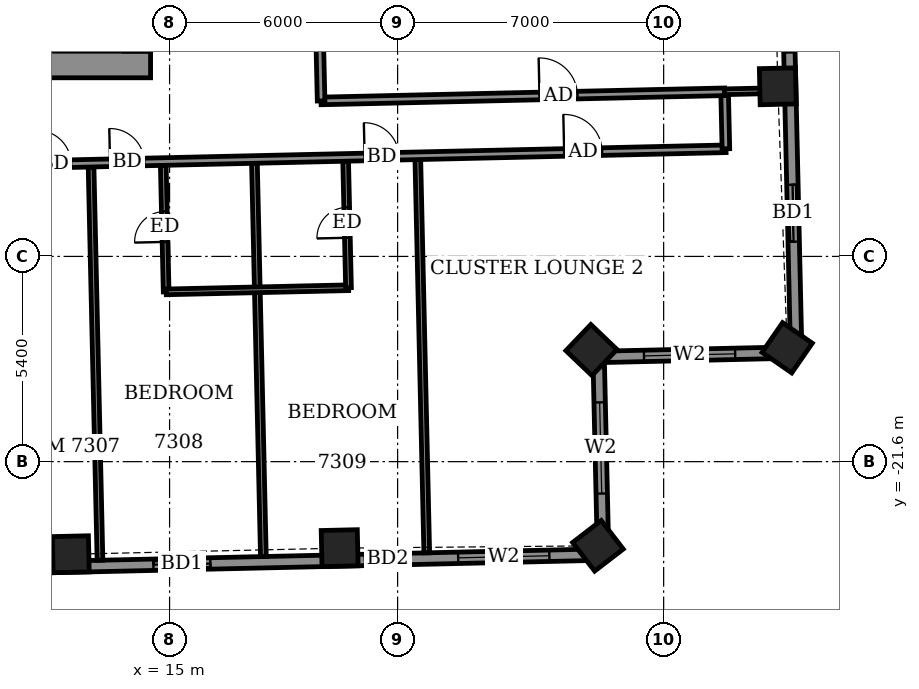
"""IFC4 building model, lengths in metres.
Left out: names, types, materials, properties, quantities, classifications, styles, units other than length and angle.
Written with IfcOpenShell. Run it as: python <this file> out.ifc"""

import sys

from ifc_helpers import new_model, si_unit, direction, frame, frame_2d, origin, origin_2d, place, context, subcontext, project, spatial, rectangle, extrude, element, fill, save


model = new_model("IFC4")
c1 = context("Model", 3, precision=1e-05, world=origin(), true_north=direction((0.0, 1.0)))
c2 = subcontext(c1, "Body", "Model", "MODEL_VIEW")
j1 = project(units=[si_unit("LENGTHUNIT", "METRE"), si_unit("PLANEANGLEUNIT", "RADIAN")], contexts=[c1])
p1 = place(None, origin())
s1 = spatial("IfcSite", under=j1, at=p1, CompositionType="ELEMENT")
p2 = place(p1, origin())
s2 = spatial("IfcBuilding", under=s1, at=p2, CompositionType="ELEMENT")
p3 = place(p2, frame((0.0, 0.0, 287.1)))
s3 = spatial("IfcBuildingStorey", under=s2, at=p3, CompositionType="ELEMENT", Elevation=287.1)
for number, where, z_axis, x_axis in (
    (1, (12.4, -24.036, -0.55), (0.0, 0.0, 1.0), (1.0, 0.023, 0.0)),
    (2, (19.475, -23.876, -0.55), (0.0, 0.0, 1.0), (1.0, 0.023, 0.0)),
    (3, (26.271, -23.814, -0.55), (0.0, 0.0, 1.0), (0.792, 0.61, 0.0)),
    (4, (26.1, -18.664, -0.55), (0.0, 0.0, 1.0), (0.691, 0.723, 0.0)),
    (5, (31.25, -18.604, -0.55), (0.0, 0.0, 1.0), (0.569, 0.822, 0.0)),
    (6, (31.004, -11.724, -0.55), (0.0, 0.0, 1.0), (-0.023, 1.0, 0.0)),
):
    element("IfcColumn", number, at=place(p3, frame(where, z_axis=z_axis, x_axis=x_axis)), inside=s3, PredefinedType="COLUMN", context=c2, shape_type="SweptSolid", body=[
        extrude(rectangle(XDim=0.95, YDim=0.95, at=origin_2d()), origin(), (0.0, 0.0, 1.0), 3.6),
    ])
p4 = place(p3, frame((31.488, -18.727, 0.0), z_axis=(0.0, 0.0, 1.0), x_axis=(-0.022666132143, 0.999743090226, 0.0)))
e7 = element("IfcWall", 7, at=p4, inside=s3, PredefinedType="SOLIDWALL", context=c2, shape_type="SweptSolid", body=[
    extrude(rectangle(XDim=14.649, YDim=0.3, at=frame_2d((7.324, 0.0))), origin(), (0.0, 0.0, 1.0), 2.5),
])
p5 = place(p4, frame((2.915, 0.0, 0.0)))
e8 = element("IfcOpeningElement", 8, at=p5, cuts=e7, PredefinedType="OPENING", context=c2, shape_type="SweptSolid", body=[
    extrude(rectangle(XDim=1.5, YDim=2.4, at=frame_2d((0.75, 1.2))), frame((0.0, 0.16, 0.0), z_axis=(0.0, -1.0, 0.0), x_axis=(1.0, 0.0, 0.0)), (0.0, 0.0, 1.0), 0.32),
])
p6 = place(p4, frame((7.895, 0.0, 0.9)))
e9 = element("IfcOpeningElement", 9, at=p6, cuts=e7, PredefinedType="OPENING", context=c2, shape_type="SweptSolid", body=[
    extrude(rectangle(XDim=2.4, YDim=1.5, at=frame_2d((1.2, 0.75))), frame((0.0, 0.16, 0.0), z_axis=(0.0, -1.0, 0.0), x_axis=(1.0, 0.0, 0.0)), (0.0, 0.0, 1.0), 0.32),
])
p7 = place(p3, frame((-22.816, -25.161, 0.0), z_axis=(0.0, 0.0, 1.0), x_axis=(0.999742646411, 0.022685699159, 0.0)))
e10 = element("IfcWall", 10, at=p7, inside=s3, PredefinedType="SOLIDWALL", context=c2, shape_type="SweptSolid", body=[
    extrude(rectangle(XDim=49.236, YDim=0.3, at=frame_2d((24.618, 0.0))), origin(), (0.0, 0.0, 1.0), 2.5),
])
p8 = place(p7, frame((2.277, 0.0, 0.0)))
e11 = element("IfcOpeningElement", 11, at=p8, cuts=e10, PredefinedType="OPENING", context=c2, shape_type="SweptSolid", body=[
    extrude(rectangle(XDim=1.5, YDim=2.4, at=frame_2d((0.75, 1.2))), frame((0.0, 0.16, 0.0), z_axis=(0.0, -1.0, 0.0), x_axis=(1.0, 0.0, 0.0)), (0.0, 0.0, 1.0), 0.32),
])
p9 = place(p7, frame((7.726, 0.0, 0.0)))
e12 = element("IfcOpeningElement", 12, at=p9, cuts=e10, PredefinedType="OPENING", context=c2, shape_type="SweptSolid", body=[
    extrude(rectangle(XDim=1.5, YDim=2.4, at=frame_2d((0.75, 1.2))), frame((0.0, 0.16, 0.0), z_axis=(0.0, -1.0, 0.0), x_axis=(1.0, 0.0, 0.0)), (0.0, 0.0, 1.0), 0.32),
])
p10 = place(p7, frame((11.039, 0.0, 0.0)))
e13 = element("IfcOpeningElement", 13, at=p10, cuts=e10, PredefinedType="OPENING", context=c2, shape_type="SweptSolid", body=[
    extrude(rectangle(XDim=1.5, YDim=2.4, at=frame_2d((0.75, 1.2))), frame((0.0, 0.16, 0.0), z_axis=(0.0, -1.0, 0.0), x_axis=(1.0, 0.0, 0.0)), (0.0, 0.0, 1.0), 0.32),
])
p11 = place(p7, frame((15.589, 0.0, 0.0)))
e14 = element("IfcOpeningElement", 14, at=p11, cuts=e10, PredefinedType="OPENING", context=c2, shape_type="SweptSolid", body=[
    extrude(rectangle(XDim=1.5, YDim=2.4, at=frame_2d((0.75, 1.2))), frame((0.0, 0.16, 0.0), z_axis=(0.0, -1.0, 0.0), x_axis=(1.0, 0.0, 0.0)), (0.0, 0.0, 1.0), 0.32),
])
p12 = place(p7, frame((18.903, 0.0, 0.0)))
e15 = element("IfcOpeningElement", 15, at=p12, cuts=e10, PredefinedType="OPENING", context=c2, shape_type="SweptSolid", body=[
    extrude(rectangle(XDim=1.5, YDim=2.4, at=frame_2d((0.75, 1.2))), frame((0.0, 0.16, 0.0), z_axis=(0.0, -1.0, 0.0), x_axis=(1.0, 0.0, 0.0)), (0.0, 0.0, 1.0), 0.32),
])
p13 = place(p7, frame((24.3, 0.0, 0.0)))
e16 = element("IfcOpeningElement", 16, at=p13, cuts=e10, PredefinedType="OPENING", context=c2, shape_type="SweptSolid", body=[
    extrude(rectangle(XDim=1.5, YDim=2.4, at=frame_2d((0.75, 1.2))), frame((0.0, 0.16, 0.0), z_axis=(0.0, -1.0, 0.0), x_axis=(1.0, 0.0, 0.0)), (0.0, 0.0, 1.0), 0.32),
])
p14 = place(p7, frame((29.265, 0.0, 0.0)))
e17 = element("IfcOpeningElement", 17, at=p14, cuts=e10, PredefinedType="OPENING", context=c2, shape_type="SweptSolid", body=[
    extrude(rectangle(XDim=1.5, YDim=2.4, at=frame_2d((0.75, 1.2))), frame((0.0, 0.16, 0.0), z_axis=(0.0, -1.0, 0.0), x_axis=(1.0, 0.0, 0.0)), (0.0, 0.0, 1.0), 0.32),
])
p15 = place(p7, frame((32.579, 0.0, 0.0)))
e18 = element("IfcOpeningElement", 18, at=p15, cuts=e10, PredefinedType="OPENING", context=c2, shape_type="SweptSolid", body=[
    extrude(rectangle(XDim=1.5, YDim=2.4, at=frame_2d((0.75, 1.2))), frame((0.0, 0.16, 0.0), z_axis=(0.0, -1.0, 0.0), x_axis=(1.0, 0.0, 0.0)), (0.0, 0.0, 1.0), 0.32),
])
p16 = place(p7, frame((37.4, 0.0, 0.0)))
e19 = element("IfcOpeningElement", 19, at=p16, cuts=e10, PredefinedType="OPENING", context=c2, shape_type="SweptSolid", body=[
    extrude(rectangle(XDim=1.5, YDim=2.4, at=frame_2d((0.75, 1.2))), frame((0.0, 0.16, 0.0), z_axis=(0.0, -1.0, 0.0), x_axis=(1.0, 0.0, 0.0)), (0.0, 0.0, 1.0), 0.32),
])
p17 = place(p7, frame((42.967, 0.0, 0.0)))
e20 = element("IfcOpeningElement", 20, at=p17, cuts=e10, PredefinedType="OPENING", context=c2, shape_type="SweptSolid", body=[
    extrude(rectangle(XDim=1.2, YDim=2.4, at=frame_2d((0.6, 1.2))), frame((0.0, 0.16, 0.0), z_axis=(0.0, -1.0, 0.0), x_axis=(1.0, 0.0, 0.0)), (0.0, 0.0, 1.0), 0.32),
])
p18 = place(p7, frame((45.421, 0.0, 0.9)))
e21 = element("IfcOpeningElement", 21, at=p18, cuts=e10, PredefinedType="OPENING", context=c2, shape_type="SweptSolid", body=[
    extrude(rectangle(XDim=2.4, YDim=1.5, at=frame_2d((1.2, 0.75))), frame((0.0, 0.16, 0.0), z_axis=(0.0, -1.0, 0.0), x_axis=(1.0, 0.0, 0.0)), (0.0, 0.0, 1.0), 0.32),
])
p19 = place(p3, frame((26.407, -24.044, 0.0), z_axis=(0.0, 0.0, 1.0), x_axis=(-0.022675548694, 0.99974287669, 0.0)))
e22 = element("IfcWall", 22, at=p19, inside=s3, PredefinedType="SOLIDWALL", context=c2, shape_type="SweptSolid", body=[
    extrude(rectangle(XDim=5.2, YDim=0.3, at=frame_2d((2.6, 0.0))), origin(), (0.0, 0.0, 1.0), 2.55),
])
p20 = place(p19, frame((1.605, 0.0, 0.9)))
e23 = element("IfcOpeningElement", 23, at=p20, cuts=e22, PredefinedType="OPENING", context=c2, shape_type="SweptSolid", body=[
    extrude(rectangle(XDim=2.4, YDim=1.5, at=frame_2d((1.2, 0.75))), frame((0.0, 0.16, 0.0), z_axis=(0.0, -1.0, 0.0), x_axis=(1.0, 0.0, 0.0)), (0.0, 0.0, 1.0), 0.32),
])
p21 = place(p3, frame((26.289, -18.845, 0.0), z_axis=(0.0, 0.0, 1.0), x_axis=(0.99974287669, 0.022675548694, 0.0)))
e24 = element("IfcWall", 24, at=p21, inside=s3, PredefinedType="SOLIDWALL", context=c2, shape_type="SweptSolid", body=[
    extrude(rectangle(XDim=5.2, YDim=0.3, at=frame_2d((2.6, 0.0))), origin(), (0.0, 0.0, 1.0), 2.55),
])
p22 = place(p21, frame((1.194, 0.0, 0.9)))
e25 = element("IfcOpeningElement", 25, at=p22, cuts=e24, PredefinedType="OPENING", context=c2, shape_type="SweptSolid", body=[
    extrude(rectangle(XDim=2.4, YDim=1.5, at=frame_2d((1.2, 0.75))), frame((0.0, 0.16, 0.0), z_axis=(0.0, -1.0, 0.0), x_axis=(1.0, 0.0, 0.0)), (0.0, 0.0, 1.0), 0.32),
])
p23 = place(p3, frame((13.169, -24.194, 0.0), z_axis=(0.0, 0.0, 1.0), x_axis=(-0.022692470342, 0.99974249274, 0.0)))
e26 = element("IfcWall", 26, at=p23, inside=s3, PredefinedType="PARTITIONING", context=c2, shape_type="SweptSolid", body=[
    extrude(rectangle(XDim=10.35, YDim=0.15, at=frame_2d((5.175, 0.0))), origin(), (0.0, 0.0, 1.0), 2.5),
])
p24 = place(p3, frame((17.468, -24.097, 0.0), z_axis=(0.0, 0.0, 1.0), x_axis=(-0.022714440015, 0.999741993824, 0.0)))
e27 = element("IfcWall", 27, at=p24, inside=s3, PredefinedType="PARTITIONING", context=c2, shape_type="SweptSolid", body=[
    extrude(rectangle(XDim=10.351, YDim=0.15, at=frame_2d((5.175, 0.0))), origin(), (0.0, 0.0, 1.0), 2.5),
])
p25 = place(p3, frame((21.767, -23.999, 0.0), z_axis=(0.0, 0.0, 1.0), x_axis=(-0.022716582742, 0.999741945138, 0.0)))
e28 = element("IfcWall", 28, at=p25, inside=s3, PredefinedType="PARTITIONING", context=c2, shape_type="SweptSolid", body=[
    extrude(rectangle(XDim=10.35, YDim=0.15, at=frame_2d((5.175, 0.0))), origin(), (0.0, 0.0, 1.0), 2.55),
])
p26 = place(p3, frame((14.91, -17.133, 0.0), z_axis=(0.0, 0.0, 1.0), x_axis=(-0.022801345323, 0.99974001553, 0.0)))
e29 = element("IfcWall", 29, at=p26, inside=s3, PredefinedType="PARTITIONING", context=c2, shape_type="SweptSolid", body=[
    extrude(rectangle(XDim=3.33, YDim=0.15, at=frame_2d((1.665, 0.0))), origin(), (0.0, 0.0, 1.0), 3.05),
])
p27 = place(p26, frame((1.315, 0.0, 0.0)))
e30 = element("IfcOpeningElement", 30, at=p27, cuts=e29, PredefinedType="OPENING", context=c2, shape_type="SweptSolid", body=[
    extrude(rectangle(XDim=0.8, YDim=2.1, at=frame_2d((0.4, 1.05))), frame((0.0, 0.085, 0.0), z_axis=(0.0, -1.0, 0.0), x_axis=(1.0, 0.0, 0.0)), (0.0, 0.0, 1.0), 0.17),
])
p28 = place(p3, frame((14.912, -17.133, 0.0), z_axis=(0.0, 0.0, 1.0), x_axis=(0.999741415159, 0.022739894798, 0.0)))
e31 = element("IfcWall", 31, at=p28, inside=s3, PredefinedType="PARTITIONING", context=c2, shape_type="SweptSolid", body=[
    extrude(rectangle(XDim=4.799, YDim=0.15, at=frame_2d((2.399, 0.0))), origin(), (0.0, 0.0, 1.0), 3.05),
])
p29 = place(p3, frame((19.708, -17.024, 0.0), z_axis=(0.0, 0.0, 1.0), x_axis=(-0.022509879905, 0.999746620553, 0.0)))
e32 = element("IfcWall", 32, at=p29, inside=s3, PredefinedType="PARTITIONING", context=c2, shape_type="SweptSolid", body=[
    extrude(rectangle(XDim=3.33, YDim=0.15, at=frame_2d((1.665, 0.0))), origin(), (0.0, 0.0, 1.0), 3.05),
])
p30 = place(p29, frame((1.315, 0.0, 0.0)))
e33 = element("IfcOpeningElement", 33, at=p30, cuts=e32, PredefinedType="OPENING", context=c2, shape_type="SweptSolid", body=[
    extrude(rectangle(XDim=0.8, YDim=2.1, at=frame_2d((0.4, 1.05))), frame((0.0, 0.085, 0.0), z_axis=(0.0, -1.0, 0.0), x_axis=(1.0, 0.0, 0.0)), (0.0, 0.0, 1.0), 0.17),
])
p31 = place(p3, frame((-25.731, -14.624, 0.0), z_axis=(0.0, 0.0, 1.0), x_axis=(0.999742799525, 0.022678950563, 0.0)))
e34 = element("IfcWall", 34, at=p31, inside=s3, PredefinedType="PARTITIONING", context=c2, shape_type="SweptSolid", body=[
    extrude(rectangle(XDim=55.386, YDim=0.2, at=frame_2d((27.693, 0.0))), origin(), (0.0, 0.0, 1.0), 3.05),
])
p32 = place(p31, frame((3.149, 0.0, 0.0)))
e35 = element("IfcOpeningElement", 35, at=p32, cuts=e34, PredefinedType="OPENING", context=c2, shape_type="SweptSolid", body=[
    extrude(rectangle(XDim=1.0, YDim=2.1, at=frame_2d((0.5, 1.05))), frame((0.0, 0.11, 0.0), z_axis=(0.0, -1.0, 0.0), x_axis=(1.0, 0.0, 0.0)), (0.0, 0.0, 1.0), 0.22),
])
p33 = place(p31, frame((11.1, 0.0, 0.0)))
e36 = element("IfcOpeningElement", 36, at=p33, cuts=e34, PredefinedType="OPENING", context=c2, shape_type="SweptSolid", body=[
    extrude(rectangle(XDim=0.9, YDim=2.1, at=frame_2d((0.45, 1.05))), frame((0.0, 0.11, 0.0), z_axis=(0.0, -1.0, 0.0), x_axis=(1.0, 0.0, 0.0)), (0.0, 0.0, 1.0), 0.22),
])
p34 = place(p31, frame((12.95, 0.0, 0.0)))
e37 = element("IfcOpeningElement", 37, at=p34, cuts=e34, PredefinedType="OPENING", context=c2, shape_type="SweptSolid", body=[
    extrude(rectangle(XDim=0.9, YDim=2.1, at=frame_2d((0.45, 1.05))), frame((0.0, 0.11, 0.0), z_axis=(0.0, -1.0, 0.0), x_axis=(1.0, 0.0, 0.0)), (0.0, 0.0, 1.0), 0.22),
])
p35 = place(p31, frame((19.675, 0.0, 0.0)))
e38 = element("IfcOpeningElement", 38, at=p35, cuts=e34, PredefinedType="OPENING", context=c2, shape_type="SweptSolid", body=[
    extrude(rectangle(XDim=0.9, YDim=2.1, at=frame_2d((0.45, 1.05))), frame((0.0, 0.11, 0.0), z_axis=(0.0, -1.0, 0.0), x_axis=(1.0, 0.0, 0.0)), (0.0, 0.0, 1.0), 0.22),
])
p36 = place(p31, frame((21.7, 0.0, 0.0)))
e39 = element("IfcOpeningElement", 39, at=p36, cuts=e34, PredefinedType="OPENING", context=c2, shape_type="SweptSolid", body=[
    extrude(rectangle(XDim=0.9, YDim=2.1, at=frame_2d((0.45, 1.05))), frame((0.0, 0.11, 0.0), z_axis=(0.0, -1.0, 0.0), x_axis=(1.0, 0.0, 0.0)), (0.0, 0.0, 1.0), 0.22),
])
p37 = place(p31, frame((28.475, 0.0, 0.0)))
e40 = element("IfcOpeningElement", 40, at=p37, cuts=e34, PredefinedType="OPENING", context=c2, shape_type="SweptSolid", body=[
    extrude(rectangle(XDim=0.9, YDim=2.1, at=frame_2d((0.45, 1.05))), frame((0.0, 0.11, 0.0), z_axis=(0.0, -1.0, 0.0), x_axis=(1.0, 0.0, 0.0)), (0.0, 0.0, 1.0), 0.22),
])
p38 = place(p31, frame((30.45, 0.0, 0.0)))
e41 = element("IfcOpeningElement", 41, at=p38, cuts=e34, PredefinedType="OPENING", context=c2, shape_type="SweptSolid", body=[
    extrude(rectangle(XDim=0.9, YDim=2.1, at=frame_2d((0.45, 1.05))), frame((0.0, 0.11, 0.0), z_axis=(0.0, -1.0, 0.0), x_axis=(1.0, 0.0, 0.0)), (0.0, 0.0, 1.0), 0.22),
])
p39 = place(p31, frame((37.25, 0.0, 0.0)))
e42 = element("IfcOpeningElement", 42, at=p39, cuts=e34, PredefinedType="OPENING", context=c2, shape_type="SweptSolid", body=[
    extrude(rectangle(XDim=0.9, YDim=2.1, at=frame_2d((0.45, 1.05))), frame((0.0, 0.11, 0.0), z_axis=(0.0, -1.0, 0.0), x_axis=(1.0, 0.0, 0.0)), (0.0, 0.0, 1.0), 0.22),
])
p40 = place(p31, frame((39.175, 0.0, 0.0)))
e43 = element("IfcOpeningElement", 43, at=p40, cuts=e34, PredefinedType="OPENING", context=c2, shape_type="SweptSolid", body=[
    extrude(rectangle(XDim=0.9, YDim=2.1, at=frame_2d((0.45, 1.05))), frame((0.0, 0.11, 0.0), z_axis=(0.0, -1.0, 0.0), x_axis=(1.0, 0.0, 0.0)), (0.0, 0.0, 1.0), 0.22),
])
p41 = place(p31, frame((45.875, 0.0, 0.0)))
e44 = element("IfcOpeningElement", 44, at=p41, cuts=e34, PredefinedType="OPENING", context=c2, shape_type="SweptSolid", body=[
    extrude(rectangle(XDim=0.9, YDim=2.1, at=frame_2d((0.45, 1.05))), frame((0.0, 0.11, 0.0), z_axis=(0.0, -1.0, 0.0), x_axis=(1.0, 0.0, 0.0)), (0.0, 0.0, 1.0), 0.22),
])
p42 = place(p31, frame((51.127, 0.0, 0.0)))
e45 = element("IfcOpeningElement", 45, at=p42, cuts=e34, PredefinedType="OPENING", context=c2, shape_type="SweptSolid", body=[
    extrude(rectangle(XDim=1.0, YDim=2.1, at=frame_2d((0.5, 1.05))), frame((0.0, 0.11, 0.0), z_axis=(0.0, -1.0, 0.0), x_axis=(1.0, 0.0, 0.0)), (0.0, 0.0, 1.0), 0.22),
])
p43 = place(p3, frame((29.638, -13.368, 0.0), z_axis=(0.0, 0.0, 1.0), x_axis=(-0.022617910375, 0.999744182344, 0.0)))
e46 = element("IfcWall", 46, at=p43, inside=s3, PredefinedType="PARTITIONING", context=c2, shape_type="SweptSolid", body=[
    extrude(rectangle(XDim=1.5, YDim=0.2, at=frame_2d((0.75, 0.0))), origin(), (0.0, 0.0, 1.0), 3.05),
])
p44 = place(p3, frame((18.985, -12.109, 0.0), z_axis=(0.0, 0.0, 1.0), x_axis=(0.999742771882, 0.022680169073, 0.0)))
e47 = element("IfcWall", 47, at=p44, inside=s3, PredefinedType="PARTITIONING", context=c2, shape_type="SweptSolid", body=[
    extrude(rectangle(XDim=10.625, YDim=0.2, at=frame_2d((5.312, 0.0))), origin(), (0.0, 0.0, 1.0), 3.05),
])
p45 = place(p44, frame((5.75, 0.0, 0.0)))
e48 = element("IfcOpeningElement", 48, at=p45, cuts=e47, PredefinedType="OPENING", context=c2, shape_type="SweptSolid", body=[
    extrude(rectangle(XDim=1.0, YDim=2.1, at=frame_2d((0.5, 1.05))), frame((0.0, 0.11, 0.0), z_axis=(0.0, -1.0, 0.0), x_axis=(1.0, 0.0, 0.0)), (0.0, 0.0, 1.0), 0.22),
])
p46 = place(p3, frame((18.987, -12.109, 0.0), z_axis=(0.0, 0.0, 1.0), x_axis=(-0.022807092041, 0.999739884446, 0.0)))
e49 = element("IfcWall", 49, at=p46, inside=s3, PredefinedType="PARTITIONING", context=c2, shape_type="SweptSolid", body=[
    extrude(rectangle(XDim=4.207, YDim=0.2, at=frame_2d((2.104, 0.0))), origin(), (0.0, 0.0, 1.0), 3.05),
])
p47 = place(p3, frame((29.603, -11.868, 0.0), z_axis=(0.0, 0.0, 1.0), x_axis=(0.999741755729, 0.022724916977, 0.0)))
e50 = element("IfcWall", 50, at=p47, inside=s3, PredefinedType="PARTITIONING", context=c2, shape_type="SweptSolid", body=[
    extrude(rectangle(XDim=1.579, YDim=0.15, at=frame_2d((0.79, 0.0))), origin(), (0.0, 0.0, 1.0), 3.05),
])
p48 = place(p3, frame((-14.5, -11.15, 0.0), z_axis=(0.0, 0.0, 1.0), x_axis=(1.0, 0.0, 0.0)))
e51 = element("IfcWall", 51, at=p48, inside=s3, PredefinedType="SHEAR", context=c2, shape_type="SweptSolid", body=[
    extrude(rectangle(XDim=29.0, YDim=0.7, at=frame_2d((14.5, 0.0))), origin(), (0.0, 0.0, 1.0), 3.6),
])
p49 = place(p5, origin())
e52 = element("IfcDoor", 52, at=p49, inside=s3, OperationType="SLIDING_TO_LEFT", PredefinedType="DOOR", context=c2, shape_type="SweptSolid", body=[
    extrude(rectangle(XDim=1.5, YDim=2.4, at=frame_2d((0.75, 1.2))), frame((0.0, 0.025, 0.0), z_axis=(0.0, -1.0, 0.0), x_axis=(1.0, 0.0, 0.0)), (0.0, 0.0, 1.0), 0.05),
])
fill(e8, e52)
p50 = place(p6, origin())
e53 = element("IfcWindow", 53, at=p50, inside=s3, PartitioningType="DOUBLE_PANEL_VERTICAL", PredefinedType="WINDOW", context=c2, shape_type="SweptSolid", body=[
    extrude(rectangle(XDim=2.4, YDim=1.5, at=frame_2d((1.2, 0.75))), frame((0.0, 0.03, 0.0), z_axis=(0.0, -1.0, 0.0), x_axis=(1.0, 0.0, 0.0)), (0.0, 0.0, 1.0), 0.06),
])
fill(e9, e53)
p51 = place(p16, origin())
e54 = element("IfcDoor", 54, at=p51, inside=s3, OperationType="SLIDING_TO_LEFT", PredefinedType="DOOR", context=c2, shape_type="SweptSolid", body=[
    extrude(rectangle(XDim=1.5, YDim=2.4, at=frame_2d((0.75, 1.2))), frame((0.0, 0.025, 0.0), z_axis=(0.0, -1.0, 0.0), x_axis=(1.0, 0.0, 0.0)), (0.0, 0.0, 1.0), 0.05),
])
fill(e19, e54)
p52 = place(p17, origin())
e55 = element("IfcDoor", 55, at=p52, inside=s3, OperationType="SLIDING_TO_LEFT", PredefinedType="DOOR", context=c2, shape_type="SweptSolid", body=[
    extrude(rectangle(XDim=1.2, YDim=2.4, at=frame_2d((0.6, 1.2))), frame((0.0, 0.025, 0.0), z_axis=(0.0, -1.0, 0.0), x_axis=(1.0, 0.0, 0.0)), (0.0, 0.0, 1.0), 0.05),
])
fill(e20, e55)
p53 = place(p18, origin())
e56 = element("IfcWindow", 56, at=p53, inside=s3, PartitioningType="DOUBLE_PANEL_VERTICAL", PredefinedType="WINDOW", context=c2, shape_type="SweptSolid", body=[
    extrude(rectangle(XDim=2.4, YDim=1.5, at=frame_2d((1.2, 0.75))), frame((0.0, 0.03, 0.0), z_axis=(0.0, -1.0, 0.0), x_axis=(1.0, 0.0, 0.0)), (0.0, 0.0, 1.0), 0.06),
])
fill(e21, e56)
p54 = place(p20, origin())
e57 = element("IfcWindow", 57, at=p54, inside=s3, PartitioningType="DOUBLE_PANEL_VERTICAL", PredefinedType="WINDOW", context=c2, shape_type="SweptSolid", body=[
    extrude(rectangle(XDim=2.4, YDim=1.5, at=frame_2d((1.2, 0.75))), frame((0.0, 0.03, 0.0), z_axis=(0.0, -1.0, 0.0), x_axis=(1.0, 0.0, 0.0)), (0.0, 0.0, 1.0), 0.06),
])
fill(e23, e57)
p55 = place(p22, origin())
e58 = element("IfcWindow", 58, at=p55, inside=s3, PartitioningType="DOUBLE_PANEL_VERTICAL", PredefinedType="WINDOW", context=c2, shape_type="SweptSolid", body=[
    extrude(rectangle(XDim=2.4, YDim=1.5, at=frame_2d((1.2, 0.75))), frame((0.0, 0.03, 0.0), z_axis=(0.0, -1.0, 0.0), x_axis=(1.0, 0.0, 0.0)), (0.0, 0.0, 1.0), 0.06),
])
fill(e25, e58)
p56 = place(p39, origin())
e59 = element("IfcDoor", 59, at=p56, inside=s3, OperationType="SINGLE_SWING_LEFT", PredefinedType="DOOR", context=c2, shape_type="SweptSolid", body=[
    extrude(rectangle(XDim=0.9, YDim=2.1, at=frame_2d((0.45, 1.05))), frame((0.0, 0.025, 0.0), z_axis=(0.0, -1.0, 0.0), x_axis=(1.0, 0.0, 0.0)), (0.0, 0.0, 1.0), 0.05),
])
fill(e42, e59)
p57 = place(p40, origin())
e60 = element("IfcDoor", 60, at=p57, inside=s3, OperationType="SINGLE_SWING_RIGHT", PredefinedType="DOOR", context=c2, shape_type="SweptSolid", body=[
    extrude(rectangle(XDim=0.9, YDim=2.1, at=frame_2d((0.45, 1.05))), frame((0.0, 0.025, 0.0), z_axis=(0.0, -1.0, 0.0), x_axis=(1.0, 0.0, 0.0)), (0.0, 0.0, 1.0), 0.05),
])
fill(e43, e60)
p58 = place(p27, origin())
e61 = element("IfcDoor", 61, at=p58, inside=s3, OperationType="SINGLE_SWING_RIGHT", PredefinedType="DOOR", context=c2, shape_type="SweptSolid", body=[
    extrude(rectangle(XDim=0.8, YDim=2.1, at=frame_2d((0.4, 1.05))), frame((0.0, 0.025, 0.0), z_axis=(0.0, -1.0, 0.0), x_axis=(1.0, 0.0, 0.0)), (0.0, 0.0, 1.0), 0.05),
])
fill(e30, e61)
p59 = place(p41, origin())
e62 = element("IfcDoor", 62, at=p59, inside=s3, OperationType="SINGLE_SWING_LEFT", PredefinedType="DOOR", context=c2, shape_type="SweptSolid", body=[
    extrude(rectangle(XDim=0.9, YDim=2.1, at=frame_2d((0.45, 1.05))), frame((0.0, 0.025, 0.0), z_axis=(0.0, -1.0, 0.0), x_axis=(1.0, 0.0, 0.0)), (0.0, 0.0, 1.0), 0.05),
])
fill(e44, e62)
p60 = place(p30, origin())
e63 = element("IfcDoor", 63, at=p60, inside=s3, OperationType="SINGLE_SWING_LEFT", PredefinedType="DOOR", context=c2, shape_type="SweptSolid", body=[
    extrude(rectangle(XDim=0.8, YDim=2.1, at=frame_2d((0.4, 1.05))), frame((0.0, 0.025, 0.0), z_axis=(0.0, -1.0, 0.0), x_axis=(1.0, 0.0, 0.0)), (0.0, 0.0, 1.0), 0.05),
])
fill(e33, e63)
p61 = place(p42, origin())
e64 = element("IfcDoor", 64, at=p61, inside=s3, OperationType="SINGLE_SWING_RIGHT", PredefinedType="DOOR", context=c2, shape_type="SweptSolid", body=[
    extrude(rectangle(XDim=1.0, YDim=2.1, at=frame_2d((0.5, 1.05))), frame((0.0, 0.025, 0.0), z_axis=(0.0, -1.0, 0.0), x_axis=(1.0, 0.0, 0.0)), (0.0, 0.0, 1.0), 0.05),
])
fill(e45, e64)
p62 = place(p45, origin())
e65 = element("IfcDoor", 65, at=p62, inside=s3, OperationType="SINGLE_SWING_LEFT", PredefinedType="DOOR", context=c2, shape_type="SweptSolid", body=[
    extrude(rectangle(XDim=1.0, YDim=2.1, at=frame_2d((0.5, 1.05))), frame((0.0, 0.025, 0.0), z_axis=(0.0, -1.0, 0.0), x_axis=(1.0, 0.0, 0.0)), (0.0, 0.0, 1.0), 0.05),
])
fill(e48, e65)
save(model, sys.argv[1])
